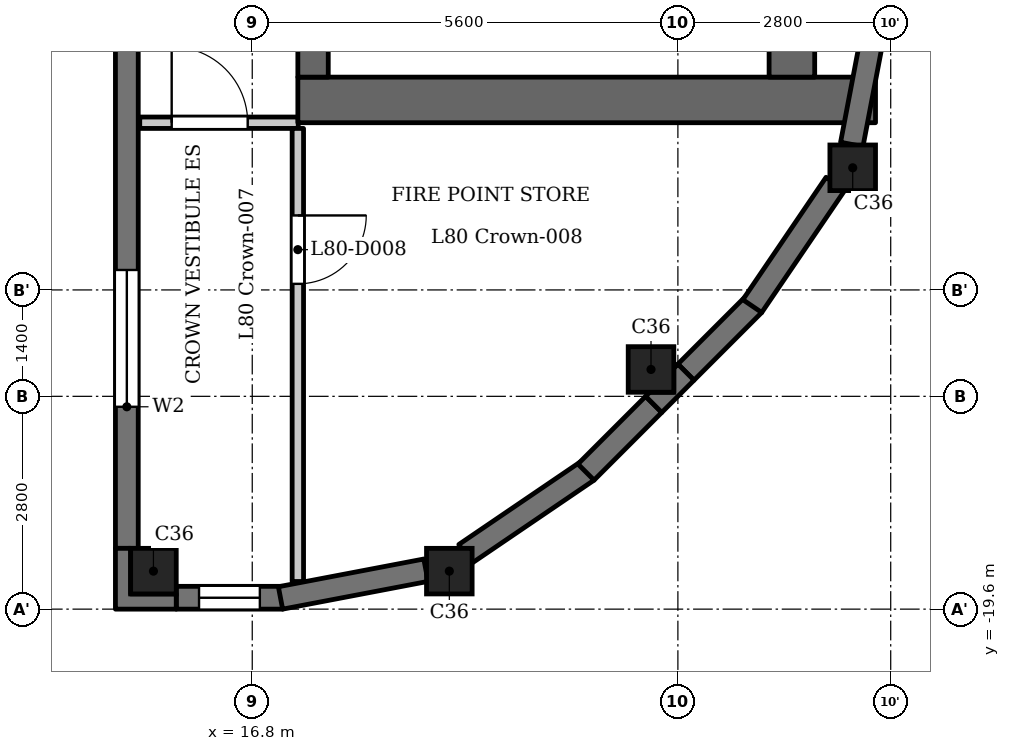
"""IFC4 building model, lengths in metres.
Left out: names, types, materials, properties, quantities, classifications, styles, units other than length and angle.
Written with IfcOpenShell. Run it as: python <this file> out.ifc"""

import sys

from ifc_helpers import new_model, si_unit, direction, frame, frame_2d, origin, origin_2d, place, context, subcontext, project, spatial, polyline, rectangle, outline, extrude, element, fill, save


model = new_model("IFC4")
c1 = context("Model", 3, precision=1e-05, world=origin(), true_north=direction((0.0, 1.0)))
c2 = subcontext(c1, "Body", "Model", "MODEL_VIEW")
j1 = project(units=[si_unit("LENGTHUNIT", "METRE"), si_unit("PLANEANGLEUNIT", "RADIAN")], contexts=[c1])
p1 = place(None, origin())
s1 = spatial("IfcSite", under=j1, at=p1, CompositionType="ELEMENT")
p2 = place(p1, origin())
s2 = spatial("IfcBuilding", under=s1, at=p2, CompositionType="ELEMENT")
p3 = place(p2, frame((0.0, 0.0, 310.4)))
s3 = spatial("IfcBuildingStorey", under=s2, at=p3, CompositionType="ELEMENT", Elevation=310.4)
for number, where, z_axis, x_axis in (
    (1, (15.5, -19.1, 0.0), (0.0, 0.0, 1.0), (1.0, 0.0, 0.0)),
    (2, (19.393, -19.1, 0.0), (0.0, 0.0, 1.0), (1.0, 0.0, 0.0)),
    (3, (22.046, -16.446, 0.0), (0.0, 0.0, 1.0), (1.0, 0.0, 0.0)),
    (4, (24.7, -13.793, 0.0), (0.0, 0.0, 1.0), (1.0, 0.0, 0.0)),
):
    element("IfcColumn", number, at=place(p3, frame(where, z_axis=z_axis, x_axis=x_axis)), inside=s3, PredefinedType="COLUMN", context=c2, shape_type="SweptSolid", body=[
        extrude(rectangle(XDim=0.6, YDim=0.6, at=origin_2d()), origin(), (0.0, 0.0, 1.0), 3.5),
    ])
p4 = place(p3, frame((15.15, -11.5, 0.0), z_axis=(0.0, 0.0, 1.0), x_axis=(0.0, -1.0, 0.0)))
e5 = element("IfcWall", 5, at=p4, inside=s3, PredefinedType="SOLIDWALL", context=c2, shape_type="SweptSolid", body=[
    extrude(rectangle(XDim=7.3, YDim=0.3, at=frame_2d((3.65, 0.0))), origin(), (0.0, 0.0, 1.0), 2.8),
])
p5 = place(p4, frame((3.637, 0.0, 0.9)))
e6 = element("IfcOpeningElement", 6, at=p5, cuts=e5, PredefinedType="OPENING", context=c2, shape_type="SweptSolid", body=[
    extrude(rectangle(XDim=1.8, YDim=1.25, at=frame_2d((0.9, 0.625))), frame((0.0, 0.16, 0.0), z_axis=(0.0, -1.0, 0.0), x_axis=(1.0, 0.0, 0.0)), (0.0, 0.0, 1.0), 0.32),
])
p6 = place(p3, frame((15.8, -19.45, 0.0), z_axis=(0.0, 0.0, 1.0), x_axis=(1.0, 0.0, 0.0)))
e7 = element("IfcWall", 7, at=p6, inside=s3, PredefinedType="SOLIDWALL", context=c2, shape_type="SweptSolid", body=[
    extrude(rectangle(XDim=1.4, YDim=0.3, at=frame_2d((0.7, 0.0))), origin(), (0.0, 0.0, 1.0), 2.8),
])
p7 = place(p6, frame((0.3, 0.0, 0.6)))
e8 = element("IfcOpeningElement", 8, at=p7, cuts=e7, PredefinedType="OPENING", context=c2, shape_type="SweptSolid", body=[
    extrude(rectangle(XDim=0.8, YDim=1.55, at=frame_2d((0.4, 0.775))), frame((0.0, 0.16, 0.0), z_axis=(0.0, -1.0, 0.0), x_axis=(1.0, 0.0, 0.0)), (0.0, 0.0, 1.0), 0.32),
])
for number, where, z_axis, x_axis in (
    (9, (17.172, -19.453, 0.0), (0.0, 0.0, 1.0), (0.982, 0.187, 0.0)),
    (10, (19.602, -18.874, 0.0), (0.0, 0.0, 1.0), (0.827, 0.562, 0.0)),
):
    element("IfcWall", number, at=place(p3, frame(where, z_axis=z_axis, x_axis=x_axis)), inside=s3, PredefinedType="SOLIDWALL", context=c2, shape_type="SweptSolid", body=[
        extrude(rectangle(XDim=1.948, YDim=0.3, at=frame_2d((0.974, 0.0))), origin(), (0.0, 0.0, 1.0), 2.2),
    ])
for number, where, z_axis, x_axis in (
    (11, (21.191, -17.797, 0.0), (0.0, 0.0, 1.0), (0.707, 0.707, 0.0)),
    (12, (22.506, -16.482, 0.0), (0.0, 0.0, 1.0), (0.707, 0.707, 0.0)),
):
    element("IfcWall", number, at=place(p3, frame(where, z_axis=z_axis, x_axis=x_axis)), inside=s3, PredefinedType="SOLIDWALL", context=c2, shape_type="SweptSolid", body=[
        extrude(rectangle(XDim=1.26, YDim=0.3, at=frame_2d((0.63, 0.0))), origin(), (0.0, 0.0, 1.0), 2.8),
    ])
p8 = place(p3, frame((23.379, -15.613, 0.0), z_axis=(0.0, 0.0, 1.0), x_axis=(0.562025435703, 0.827119948752, 0.0)))
e13 = element("IfcWall", 13, at=p8, inside=s3, PredefinedType="SOLIDWALL", context=c2, shape_type="SweptSolid", body=[
    extrude(rectangle(XDim=1.948, YDim=0.3, at=frame_2d((0.974, 0.0))), origin(), (0.0, 0.0, 1.0), 2.2),
])
p9 = place(p3, frame((24.688, -13.485, 0.0), z_axis=(0.0, 0.0, 1.0), x_axis=(0.187354129902, 0.982292436095, 0.0)))
e14 = element("IfcWall", 14, at=p9, inside=s3, PredefinedType="SOLIDWALL", context=c2, shape_type="SweptSolid", body=[
    extrude(rectangle(XDim=1.947, YDim=0.3, at=frame_2d((0.973, 0.0))), origin(), (0.0, 0.0, 1.0), 2.2),
])
p10 = place(p3, frame((17.4, -12.9, 0.0), z_axis=(0.0, 0.0, 1.0), x_axis=(1.0, 0.0, 0.0)))
e15 = element("IfcWall", 15, at=p10, inside=s3, PredefinedType="SHEAR", context=c2, shape_type="SweptSolid", body=[
    extrude(rectangle(XDim=7.6, YDim=0.6, at=frame_2d((3.8, 0.0))), origin(), (0.0, 0.0, 1.0), 2.8),
])
p11 = place(p3, frame((17.6, -12.6, 0.0), z_axis=(0.0, 0.0, 1.0), x_axis=(0.0, 1.0, 0.0)))
e16 = element("IfcWall", 16, at=p11, inside=s3, PredefinedType="SHEAR", context=c2, shape_type="SweptSolid", body=[
    extrude(rectangle(XDim=25.2, YDim=0.4, at=frame_2d((12.6, 0.0))), origin(), (0.0, 0.0, 1.0), 2.8),
])
p12 = place(p11, frame((6.475, 0.0, 0.0)))
e17 = element("IfcOpeningElement", 17, at=p12, cuts=e16, PredefinedType="OPENING", context=c2, shape_type="SweptSolid", body=[
    extrude(rectangle(XDim=0.9, YDim=2.1, at=frame_2d((0.45, 1.05))), frame((0.0, 0.21, 0.0), z_axis=(0.0, -1.0, 0.0), x_axis=(1.0, 0.0, 0.0)), (0.0, 0.0, 1.0), 0.42),
])
p13 = place(p11, frame((10.075, 0.0, 0.0)))
e18 = element("IfcOpeningElement", 18, at=p13, cuts=e16, PredefinedType="OPENING", context=c2, shape_type="SweptSolid", body=[
    extrude(rectangle(XDim=0.9, YDim=2.1, at=frame_2d((0.45, 1.05))), frame((0.0, 0.21, 0.0), z_axis=(0.0, -1.0, 0.0), x_axis=(1.0, 0.0, 0.0)), (0.0, 0.0, 1.0), 0.42),
])
p14 = place(p11, frame((17.05, 0.0, 0.0)))
e19 = element("IfcOpeningElement", 19, at=p14, cuts=e16, PredefinedType="OPENING", context=c2, shape_type="SweptSolid", body=[
    extrude(rectangle(XDim=0.9, YDim=2.1, at=frame_2d((0.45, 1.05))), frame((0.0, 0.21, 0.0), z_axis=(0.0, -1.0, 0.0), x_axis=(1.0, 0.0, 0.0)), (0.0, 0.0, 1.0), 0.42),
])
p15 = place(p11, frame((23.25, 0.0, 0.0)))
e20 = element("IfcOpeningElement", 20, at=p15, cuts=e16, PredefinedType="OPENING", context=c2, shape_type="SweptSolid", body=[
    extrude(rectangle(XDim=1.1, YDim=2.1, at=frame_2d((0.55, 1.05))), frame((0.0, 0.21, 0.0), z_axis=(0.0, -1.0, 0.0), x_axis=(1.0, 0.0, 0.0)), (0.0, 0.0, 1.0), 0.42),
])
p16 = place(p11, frame((0.85, 0.0, 0.0)))
e21 = element("IfcOpeningElement", 21, at=p16, cuts=e16, PredefinedType="OPENING", context=c2, shape_type="SweptSolid", body=[
    extrude(rectangle(XDim=1.1, YDim=2.1, at=frame_2d((0.55, 1.05))), frame((0.0, 0.21, 0.0), z_axis=(0.0, -1.0, 0.0), x_axis=(1.0, 0.0, 0.0)), (0.0, 0.0, 1.0), 0.42),
])
p17 = place(p11, frame((13.075, 0.0, 0.0)))
e22 = element("IfcOpeningElement", 22, at=p17, cuts=e16, PredefinedType="OPENING", context=c2, shape_type="SweptSolid", body=[
    extrude(rectangle(XDim=1.8, YDim=2.1, at=frame_2d((0.9, 1.05))), frame((0.0, 0.21, 0.0), z_axis=(0.0, -1.0, 0.0), x_axis=(1.0, 0.0, 0.0)), (0.0, 0.0, 1.0), 0.42),
])
p18 = place(p3, frame((23.9, -12.6, 0.0), z_axis=(0.0, 0.0, 1.0), x_axis=(0.0, 1.0, 0.0)))
e23 = element("IfcWall", 23, at=p18, inside=s3, PredefinedType="SHEAR", context=c2, shape_type="SweptSolid", body=[
    extrude(rectangle(XDim=25.2, YDim=0.6, at=frame_2d((12.6, 0.0))), origin(), (0.0, 0.0, 1.0), 2.8),
])
p19 = place(p3, frame((15.32, -13.2, 0.0), z_axis=(0.0, 0.0, 1.0), x_axis=(1.0, 0.0, 0.0)))
e24 = element("IfcWall", 24, at=p19, inside=s3, PredefinedType="PARTITIONING", context=c2, shape_type="SweptSolid", body=[
    extrude(rectangle(XDim=2.085, YDim=0.15, at=frame_2d((1.042, 0.0))), origin(), (0.0, 0.0, 1.0), 2.8),
])
p20 = place(p19, frame((0.42, 0.0, 0.0)))
e25 = element("IfcOpeningElement", 25, at=p20, cuts=e24, PredefinedType="OPENING", context=c2, shape_type="SweptSolid", body=[
    extrude(rectangle(XDim=1.0, YDim=2.1, at=frame_2d((0.5, 1.05))), frame((0.0, 0.085, 0.0), z_axis=(0.0, -1.0, 0.0), x_axis=(1.0, 0.0, 0.0)), (0.0, 0.0, 1.0), 0.17),
])
p21 = place(p3, frame((17.4, -19.236, 0.0), z_axis=(0.0, 0.0, 1.0), x_axis=(0.0, 1.0, 0.0)))
e26 = element("IfcWall", 26, at=p21, inside=s3, PredefinedType="PARTITIONING", context=c2, shape_type="SweptSolid", body=[
    extrude(rectangle(XDim=5.961, YDim=0.15, at=frame_2d((2.981, 0.0))), origin(), (0.0, 0.0, 1.0), 2.8),
])
p22 = place(p21, frame((3.917, 0.0, 0.0)))
e27 = element("IfcOpeningElement", 27, at=p22, cuts=e26, PredefinedType="OPENING", context=c2, shape_type="SweptSolid", body=[
    extrude(rectangle(XDim=0.9, YDim=2.1, at=frame_2d((0.45, 1.05))), frame((0.0, 0.085, 0.0), z_axis=(0.0, -1.0, 0.0), x_axis=(1.0, 0.0, 0.0)), (0.0, 0.0, 1.0), 0.17),
])
p23 = place(p3, origin())
e28 = element("IfcWall", 28, at=p23, inside=s3, PredefinedType="SOLIDWALL", context=c2, shape_type="SweptSolid", body=[
    extrude(outline(polyline([(21.976, -16.8), (22.188, -17.012), (22.612, -16.588), (22.4, -16.376), (22.346, -16.429), (22.346, -16.746), (22.029, -16.746), (21.976, -16.8)])), origin(), (0.0, 0.0, 1.0), 2.8),
])
e29 = element("IfcWall", 29, at=p23, inside=s3, PredefinedType="SOLIDWALL", context=c2, shape_type="SweptSolid", body=[
    extrude(outline(polyline([(15.0, -18.8), (15.0, -19.6), (15.8, -19.6), (15.8, -19.4), (15.2, -19.4), (15.2, -18.8), (15.0, -18.8)])), origin(), (0.0, 0.0, 1.0), 2.8),
])
p24 = place(p20, origin())
e30 = element("IfcDoor", 30, at=p24, inside=s3, OperationType="SINGLE_SWING_RIGHT", PredefinedType="DOOR", context=c2, shape_type="SweptSolid", body=[
    extrude(rectangle(XDim=1.0, YDim=2.1, at=frame_2d((0.5, 1.05))), frame((0.0, 0.025, 0.0), z_axis=(0.0, -1.0, 0.0), x_axis=(1.0, 0.0, 0.0)), (0.0, 0.0, 1.0), 0.05),
])
fill(e25, e30)
p25 = place(p22, origin())
e31 = element("IfcDoor", 31, at=p25, inside=s3, OperationType="SINGLE_SWING_RIGHT", PredefinedType="DOOR", context=c2, shape_type="SweptSolid", body=[
    extrude(rectangle(XDim=0.9, YDim=2.1, at=frame_2d((0.45, 1.05))), frame((0.0, 0.025, 0.0), z_axis=(0.0, -1.0, 0.0), x_axis=(1.0, 0.0, 0.0)), (0.0, 0.0, 1.0), 0.05),
])
fill(e27, e31)
p26 = place(p5, origin())
e32 = element("IfcWindow", 32, at=p26, inside=s3, PartitioningType="SINGLE_PANEL", PredefinedType="WINDOW", context=c2, shape_type="SweptSolid", body=[
    extrude(rectangle(XDim=1.8, YDim=1.25, at=frame_2d((0.9, 0.625))), frame((0.0, 0.03, 0.0), z_axis=(0.0, -1.0, 0.0), x_axis=(1.0, 0.0, 0.0)), (0.0, 0.0, 1.0), 0.06),
])
fill(e6, e32)
p27 = place(p7, origin())
e33 = element("IfcWindow", 33, at=p27, inside=s3, PartitioningType="SINGLE_PANEL", PredefinedType="WINDOW", context=c2, shape_type="SweptSolid", body=[
    extrude(rectangle(XDim=0.8, YDim=1.55, at=frame_2d((0.4, 0.775))), frame((0.0, 0.03, 0.0), z_axis=(0.0, -1.0, 0.0), x_axis=(1.0, 0.0, 0.0)), (0.0, 0.0, 1.0), 0.06),
])
fill(e8, e33)
save(model, sys.argv[1])
